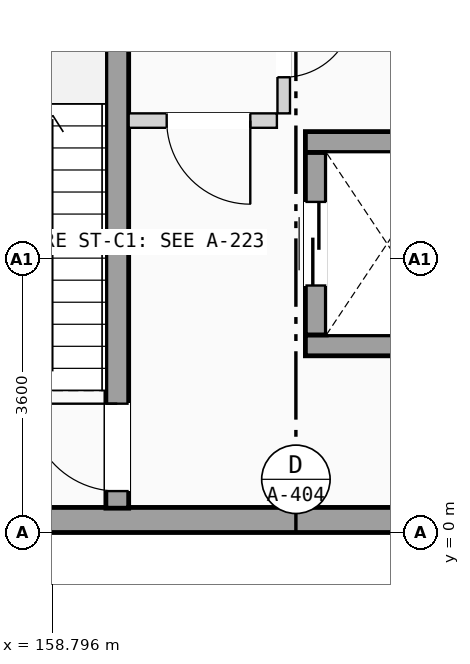
"""IFC4 building model, lengths in metres.
Left out: names, types, materials, properties, quantities, classifications, styles, units other than length and angle.
Written with IfcOpenShell. Run it as: python <this file> out.ifc"""

import sys

from ifc_helpers import new_model, si_unit, direction, frame, frame_2d, origin, place, context, subcontext, project, spatial, rectangle, extrude, element, fill, save


model = new_model("IFC4")
c1 = context("Model", 3, precision=1e-05, world=origin(), true_north=direction((0.0, 1.0)))
c2 = subcontext(c1, "Body", "Model", "MODEL_VIEW")
j1 = project(units=[si_unit("LENGTHUNIT", "METRE"), si_unit("PLANEANGLEUNIT", "RADIAN")], contexts=[c1])
p1 = place(None, origin())
s1 = spatial("IfcSite", under=j1, at=p1, CompositionType="ELEMENT")
p2 = place(p1, origin())
s2 = spatial("IfcBuilding", under=s1, at=p2, CompositionType="ELEMENT")
p3 = place(p2, origin())
s3 = spatial("IfcBuildingStorey", under=s2, at=p3, CompositionType="ELEMENT", Elevation=0.0)
p4 = place(p3, frame((147.6, 0.165, 0.0), z_axis=(0.0, 0.0, 1.0), x_axis=(1.0, 0.0, 0.0)))
e1 = element("IfcWall", 1, at=p4, inside=s3, PredefinedType="SOLIDWALL", context=c2, shape_type="SweptSolid", body=[
    extrude(rectangle(XDim=25.2, YDim=0.33, at=frame_2d((12.6, 0.0))), origin(), (0.0, 0.0, 1.0), 4.64),
])
p5 = place(p4, frame((9.75, 0.0, 0.0)))
e2 = element("IfcOpeningElement", 2, at=p5, cuts=e1, PredefinedType="OPENING", context=c2, shape_type="SweptSolid", body=[
    extrude(rectangle(XDim=1.3, YDim=2.2, at=frame_2d((0.65, 1.1))), frame((0.0, 0.175, 0.0), z_axis=(0.0, -1.0, 0.0), x_axis=(1.0, 0.0, 0.0)), (0.0, 0.0, 1.0), 0.35),
])
p6 = place(p3, frame((159.65, 0.32, 0.0), z_axis=(0.0, 0.0, 1.0), x_axis=(0.0, 1.0, 0.0)))
e3 = element("IfcWall", 3, at=p6, inside=s3, PredefinedType="SHEAR", context=c2, shape_type="SweptSolid", body=[
    extrude(rectangle(XDim=7.0, YDim=0.3, at=frame_2d((3.5, 0.0))), origin(), (0.0, 0.0, 1.0), 4.64),
])
p7 = place(p6, frame((0.225, 0.0, 0.0)))
e4 = element("IfcOpeningElement", 4, at=p7, cuts=e3, PredefinedType="OPENING", context=c2, shape_type="SweptSolid", body=[
    extrude(rectangle(XDim=1.15, YDim=2.12, at=frame_2d((0.575, 1.06))), frame((0.0, 0.16, 0.0), z_axis=(0.0, -1.0, 0.0), x_axis=(1.0, 0.0, 0.0)), (0.0, 0.0, 1.0), 0.32),
])
for number, where, z_axis, x_axis in (
    (5, (162.125, 2.462, 0.0), (0.0, 0.0, 1.0), (1.0, 0.0, 0.0)),
    (6, (162.125, 5.137, 0.0), (0.0, 0.0, 1.0), (1.0, 0.0, 0.0)),
):
    element("IfcWall", number, at=place(p3, frame(where, z_axis=z_axis, x_axis=x_axis)), inside=s3, PredefinedType="SHEAR", context=c2, shape_type="SweptSolid", body=[
        extrude(rectangle(XDim=2.15, YDim=0.275, at=frame_2d((1.075, 0.0))), origin(), (0.0, 0.0, 1.0), 4.64),
    ])
p8 = place(p3, frame((162.262, 2.6, 0.0), z_axis=(0.0, 0.0, 1.0), x_axis=(0.0, 1.0, 0.0)))
e7 = element("IfcWall", 7, at=p8, inside=s3, PredefinedType="SHEAR", context=c2, shape_type="SweptSolid", body=[
    extrude(rectangle(XDim=2.4, YDim=0.275, at=frame_2d((1.2, 0.0))), origin(), (0.0, 0.0, 1.0), 4.64),
])
p9 = place(p8, frame((0.65, 0.0, 0.0)))
e8 = element("IfcOpeningElement", 8, at=p9, cuts=e7, PredefinedType="OPENING", context=c2, shape_type="SweptSolid", body=[
    extrude(rectangle(XDim=1.1, YDim=2.15, at=frame_2d((0.55, 1.075))), frame((0.0, 0.147, 0.0), z_axis=(0.0, -1.0, 0.0), x_axis=(1.0, 0.0, 0.0)), (0.0, 0.0, 1.0), 0.295),
])
p10 = place(p3, frame((159.8, 5.42, 0.0), z_axis=(0.0, 0.0, 1.0), x_axis=(1.0, 0.0, 0.0)))
e9 = element("IfcWall", 9, at=p10, inside=s3, PredefinedType="PARTITIONING", context=c2, shape_type="SweptSolid", body=[
    extrude(rectangle(XDim=1.95, YDim=0.19, at=frame_2d((0.975, 0.0))), origin(), (0.0, 0.0, 1.0), 3.84),
])
p11 = place(p10, frame((0.5, 0.0, 0.0)))
e10 = element("IfcOpeningElement", 10, at=p11, cuts=e9, PredefinedType="OPENING", context=c2, shape_type="SweptSolid", body=[
    extrude(rectangle(XDim=1.1, YDim=2.12, at=frame_2d((0.55, 1.06))), frame((0.0, 0.105, 0.0), z_axis=(0.0, -1.0, 0.0), x_axis=(1.0, 0.0, 0.0)), (0.0, 0.0, 1.0), 0.21),
])
p12 = place(p3, frame((161.84, 5.515, 0.0), z_axis=(0.0, 0.0, 1.0), x_axis=(0.0, 1.0, 0.0)))
e11 = element("IfcWall", 11, at=p12, inside=s3, PredefinedType="PARTITIONING", context=c2, shape_type="SweptSolid", body=[
    extrude(rectangle(XDim=1.835, YDim=0.165, at=frame_2d((0.917, 0.0))), origin(), (0.0, 0.0, 1.0), 3.84),
])
p13 = place(p12, frame((0.475, 0.0, 0.0)))
e12 = element("IfcOpeningElement", 12, at=p13, cuts=e11, PredefinedType="OPENING", context=c2, shape_type="SweptSolid", body=[
    extrude(rectangle(XDim=0.92, YDim=2.04, at=frame_2d((0.46, 1.02))), frame((0.0, 0.093, 0.0), z_axis=(0.0, -1.0, 0.0), x_axis=(1.0, 0.0, 0.0)), (0.0, 0.0, 1.0), 0.185),
])
p14 = place(p7, origin())
e13 = element("IfcDoor", 13, at=p14, inside=s3, OperationType="SINGLE_SWING_RIGHT", PredefinedType="DOOR", context=c2, shape_type="SweptSolid", body=[
    extrude(rectangle(XDim=1.15, YDim=2.12, at=frame_2d((0.575, 1.06))), frame((0.0, 0.025, 0.0), z_axis=(0.0, -1.0, 0.0), x_axis=(1.0, 0.0, 0.0)), (0.0, 0.0, 1.0), 0.05),
])
fill(e4, e13)
p15 = place(p9, origin())
e14 = element("IfcDoor", 14, at=p15, inside=s3, OperationType="SLIDING_TO_LEFT", PredefinedType="DOOR", context=c2, shape_type="SweptSolid", body=[
    extrude(rectangle(XDim=1.1, YDim=2.15, at=frame_2d((0.55, 1.075))), frame((0.0, 0.025, 0.0), z_axis=(0.0, -1.0, 0.0), x_axis=(1.0, 0.0, 0.0)), (0.0, 0.0, 1.0), 0.05),
])
fill(e8, e14)
p16 = place(p11, frame((1.1, 0.0, 0.0), z_axis=(0.0, 0.0, 1.0), x_axis=(-1.0, 0.0, 0.0)))
e15 = element("IfcDoor", 15, at=p16, inside=s3, OperationType="SINGLE_SWING_RIGHT", PredefinedType="DOOR", context=c2, shape_type="SweptSolid", body=[
    extrude(rectangle(XDim=1.1, YDim=2.12, at=frame_2d((0.55, 1.06))), frame((0.0, 0.025, 0.0), z_axis=(0.0, -1.0, 0.0), x_axis=(1.0, 0.0, 0.0)), (0.0, 0.0, 1.0), 0.05),
])
fill(e10, e15)
p17 = place(p13, frame((0.92, 0.0, 0.0), z_axis=(0.0, 0.0, 1.0), x_axis=(-1.0, 0.0, 0.0)))
e16 = element("IfcDoor", 16, at=p17, inside=s3, OperationType="SINGLE_SWING_RIGHT", PredefinedType="DOOR", context=c2, shape_type="SweptSolid", body=[
    extrude(rectangle(XDim=0.92, YDim=2.04, at=frame_2d((0.46, 1.02))), frame((0.0, 0.025, 0.0), z_axis=(0.0, -1.0, 0.0), x_axis=(1.0, 0.0, 0.0)), (0.0, 0.0, 1.0), 0.05),
])
fill(e12, e16)
save(model, sys.argv[1])
